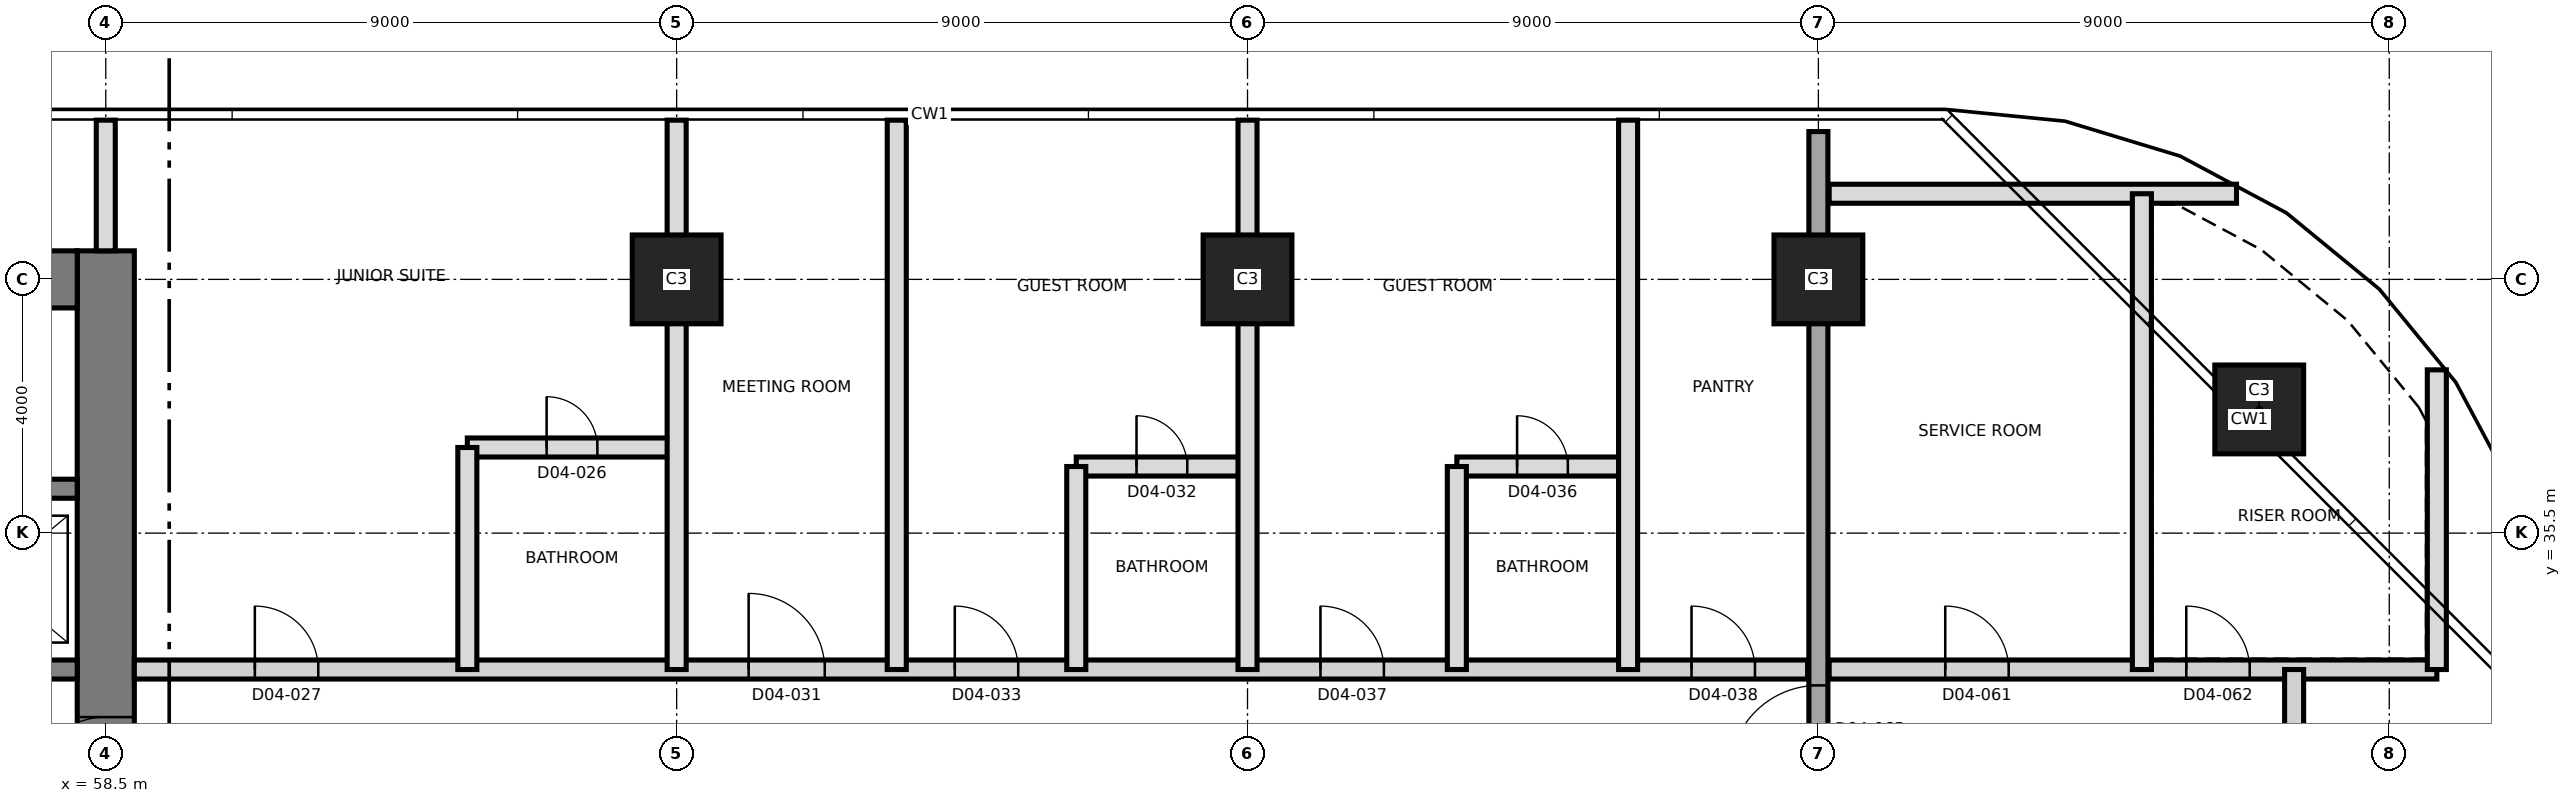
"""IFC4 building model, lengths in metres.
Left out: names, types, materials, properties, quantities, classifications, styles, units other than length and angle.
Written with IfcOpenShell. Run it as: python <this file> out.ifc"""

import sys

from ifc_helpers import new_model, si_unit, direction, frame, frame_2d, origin, origin_2d, place, context, subcontext, project, spatial, rectangle, extrude, element, fill, save


model = new_model("IFC4")
c1 = context("Model", 3, precision=1e-05, world=origin(), true_north=direction((0.0, 1.0)))
c2 = subcontext(c1, "Body", "Model", "MODEL_VIEW")
j1 = project(units=[si_unit("LENGTHUNIT", "METRE"), si_unit("PLANEANGLEUNIT", "RADIAN")], contexts=[c1])
p1 = place(None, origin())
s1 = spatial("IfcSite", under=j1, at=p1, CompositionType="ELEMENT")
p2 = place(p1, origin())
s2 = spatial("IfcBuilding", under=s1, at=p2, CompositionType="ELEMENT")
p3 = place(p2, frame((0.0, 0.0, 66.8)))
s3 = spatial("IfcBuildingStorey", under=s2, at=p3, CompositionType="ELEMENT", Elevation=66.8)
p4 = place(p3, frame((58.5, 21.05, 0.0), z_axis=(0.0, 0.0, 1.0), x_axis=(0.0, 1.0, 0.0)))
e1 = element("IfcWall", 1, at=p4, inside=s3, PredefinedType="SHEAR", context=c2, shape_type="SweptSolid", body=[
    extrude(rectangle(XDim=18.9, YDim=0.9, at=frame_2d((9.45, 0.0))), origin(), (0.0, 0.0, 1.0), 3.7),
])
p5 = place(p4, frame((10.35, 0.0, 0.0)))
e2 = element("IfcOpeningElement", 2, at=p5, cuts=e1, PredefinedType="OPENING", context=c2, shape_type="SweptSolid", body=[
    extrude(rectangle(XDim=1.2, YDim=2.1, at=frame_2d((0.6, 1.05))), frame((0.0, 0.46, 0.0), z_axis=(0.0, -1.0, 0.0), x_axis=(1.0, 0.0, 0.0)), (0.0, 0.0, 1.0), 0.92),
])
p6 = place(p3, frame((31.05, 39.5, 0.0), z_axis=(0.0, 0.0, 1.0), x_axis=(1.0, 0.0, 0.0)))
e3 = element("IfcWall", 3, at=p6, inside=s3, PredefinedType="SHEAR", context=c2, shape_type="SweptSolid", body=[
    extrude(rectangle(XDim=27.0, YDim=0.9, at=frame_2d((13.5, 0.0))), origin(), (0.0, 0.0, 1.0), 3.7),
])
p7 = place(p6, frame((10.65, 0.0, 0.0)))
e4 = element("IfcOpeningElement", 4, at=p7, cuts=e3, PredefinedType="OPENING", context=c2, shape_type="SweptSolid", body=[
    extrude(rectangle(XDim=1.2, YDim=2.1, at=frame_2d((0.6, 1.05))), frame((0.0, 0.46, 0.0), z_axis=(0.0, -1.0, 0.0), x_axis=(1.0, 0.0, 0.0)), (0.0, 0.0, 1.0), 0.92),
])
p8 = place(p3, frame((31.95, 33.35, 0.0), z_axis=(0.0, 0.0, 1.0), x_axis=(1.0, 0.0, 0.0)))
e5 = element("IfcWall", 5, at=p8, inside=s3, PredefinedType="SHEAR", context=c2, shape_type="SweptSolid", body=[
    extrude(rectangle(XDim=26.1, YDim=0.3, at=frame_2d((13.05, 0.0))), origin(), (0.0, 0.0, 1.0), 3.7),
])
p9 = place(p8, frame((13.7, 0.0, 0.0)))
e6 = element("IfcOpeningElement", 6, at=p9, cuts=e5, PredefinedType="OPENING", context=c2, shape_type="SweptSolid", body=[
    extrude(rectangle(XDim=1.4, YDim=2.1, at=frame_2d((0.7, 1.05))), frame((0.0, 0.16, 0.0), z_axis=(0.0, -1.0, 0.0), x_axis=(1.0, 0.0, 0.0)), (0.0, 0.0, 1.0), 0.32),
])
p10 = place(p8, frame((5.175, 0.0, 0.0)))
e7 = element("IfcOpeningElement", 7, at=p10, cuts=e5, PredefinedType="OPENING", context=c2, shape_type="SweptSolid", body=[
    extrude(rectangle(XDim=1.2, YDim=2.1, at=frame_2d((0.6, 1.05))), frame((0.0, 0.16, 0.0), z_axis=(0.0, -1.0, 0.0), x_axis=(1.0, 0.0, 0.0)), (0.0, 0.0, 1.0), 0.32),
])
p11 = place(p8, frame((19.725, 0.0, 0.0)))
e8 = element("IfcOpeningElement", 8, at=p11, cuts=e5, PredefinedType="OPENING", context=c2, shape_type="SweptSolid", body=[
    extrude(rectangle(XDim=1.2, YDim=2.1, at=frame_2d((0.6, 1.05))), frame((0.0, 0.16, 0.0), z_axis=(0.0, -1.0, 0.0), x_axis=(1.0, 0.0, 0.0)), (0.0, 0.0, 1.0), 0.32),
])
p12 = place(p3, frame((43.5, 36.2, 0.0), z_axis=(0.0, 0.0, 1.0), x_axis=(1.0, 0.0, 0.0)))
e9 = element("IfcWall", 9, at=p12, inside=s3, PredefinedType="SHEAR", context=c2, shape_type="SweptSolid", body=[
    extrude(rectangle(XDim=14.55, YDim=0.3, at=frame_2d((7.275, 0.0))), origin(), (0.0, 0.0, 1.0), 3.7),
])
p13 = place(p12, frame((6.9, 0.0, 0.0)))
e10 = element("IfcOpeningElement", 10, at=p13, cuts=e9, PredefinedType="OPENING", context=c2, shape_type="SweptSolid", body=[
    extrude(rectangle(XDim=1.2, YDim=2.1, at=frame_2d((0.6, 1.05))), frame((0.0, 0.16, 0.0), z_axis=(0.0, -1.0, 0.0), x_axis=(1.0, 0.0, 0.0)), (0.0, 0.0, 1.0), 0.32),
])
p14 = place(p12, frame((0.7, 0.0, 0.0)))
e11 = element("IfcOpeningElement", 11, at=p14, cuts=e9, PredefinedType="OPENING", context=c2, shape_type="SweptSolid", body=[
    extrude(rectangle(XDim=1.3, YDim=2.4, at=frame_2d((0.65, 1.2))), frame((0.0, 0.16, 0.0), z_axis=(0.0, -1.0, 0.0), x_axis=(1.0, 0.0, 0.0)), (0.0, 0.0, 1.0), 0.32),
])
p15 = place(p12, frame((3.7, 0.0, 0.0)))
e12 = element("IfcOpeningElement", 12, at=p15, cuts=e9, PredefinedType="OPENING", context=c2, shape_type="SweptSolid", body=[
    extrude(rectangle(XDim=1.3, YDim=2.4, at=frame_2d((0.65, 1.2))), frame((0.0, 0.16, 0.0), z_axis=(0.0, -1.0, 0.0), x_axis=(1.0, 0.0, 0.0)), (0.0, 0.0, 1.0), 0.32),
])
for number, where, z_axis, x_axis in (
    (13, (92.45, 37.45, 0.0), (0.0, 0.0, 1.0), (1.0, 0.0, 0.0)),
    (14, (67.5, 39.5, 0.0), (0.0, 0.0, 1.0), (1.0, 0.0, 0.0)),
    (15, (76.5, 39.5, 0.0), (0.0, 0.0, 1.0), (1.0, 0.0, 0.0)),
    (16, (85.5, 39.5, 0.0), (0.0, 0.0, 1.0), (1.0, 0.0, 0.0)),
):
    element("IfcColumn", number, at=place(p3, frame(where, z_axis=z_axis, x_axis=x_axis)), inside=s3, PredefinedType="COLUMN", context=c2, shape_type="SweptSolid", body=[
        extrude(rectangle(XDim=1.4, YDim=1.4, at=origin_2d()), origin(), (0.0, 0.0, 1.0), 3.7),
    ])
p16 = place(p3, frame((85.5, 19.17, 0.0), z_axis=(0.0, 0.0, 1.0), x_axis=(0.0, 1.0, 0.0)))
e17 = element("IfcWall", 17, at=p16, inside=s3, PredefinedType="SHEAR", context=c2, shape_type="SweptSolid", body=[
    extrude(rectangle(XDim=22.66, YDim=0.3, at=frame_2d((11.33, 0.0))), origin(), (0.0, 0.0, 1.0), 3.7),
])
p17 = place(p16, frame((12.53, 0.0, 0.0)))
e18 = element("IfcOpeningElement", 18, at=p17, cuts=e17, PredefinedType="OPENING", context=c2, shape_type="SweptSolid", body=[
    extrude(rectangle(XDim=1.4, YDim=2.1, at=frame_2d((0.7, 1.05))), frame((0.0, 0.16, 0.0), z_axis=(0.0, -1.0, 0.0), x_axis=(1.0, 0.0, 0.0)), (0.0, 0.0, 1.0), 0.32),
])
p18 = place(p3, frame((58.95, 33.35, 0.0), z_axis=(0.0, 0.0, 1.0), x_axis=(1.0, 0.0, 0.0)))
e19 = element("IfcWall", 19, at=p18, inside=s3, PredefinedType="PARTITIONING", context=c2, shape_type="SweptSolid", body=[
    extrude(rectangle(XDim=26.38, YDim=0.3, at=frame_2d((13.19, 0.0))), origin(), (0.0, 0.0, 1.0), 3.4),
])
p19 = place(p18, frame((1.9, 0.0, 0.0)))
e20 = element("IfcOpeningElement", 20, at=p19, cuts=e19, PredefinedType="OPENING", context=c2, shape_type="SweptSolid", body=[
    extrude(rectangle(XDim=1.0, YDim=2.4, at=frame_2d((0.5, 1.2))), frame((0.0, 0.16, 0.0), z_axis=(0.0, -1.0, 0.0), x_axis=(1.0, 0.0, 0.0)), (0.0, 0.0, 1.0), 0.32),
])
p20 = place(p18, frame((9.685, 0.0, 0.0)))
e21 = element("IfcOpeningElement", 21, at=p20, cuts=e19, PredefinedType="OPENING", context=c2, shape_type="SweptSolid", body=[
    extrude(rectangle(XDim=1.2, YDim=2.1, at=frame_2d((0.6, 1.05))), frame((0.0, 0.16, 0.0), z_axis=(0.0, -1.0, 0.0), x_axis=(1.0, 0.0, 0.0)), (0.0, 0.0, 1.0), 0.32),
])
p21 = place(p18, frame((12.935, 0.0, 0.0)))
e22 = element("IfcOpeningElement", 22, at=p21, cuts=e19, PredefinedType="OPENING", context=c2, shape_type="SweptSolid", body=[
    extrude(rectangle(XDim=1.0, YDim=2.1, at=frame_2d((0.5, 1.05))), frame((0.0, 0.16, 0.0), z_axis=(0.0, -1.0, 0.0), x_axis=(1.0, 0.0, 0.0)), (0.0, 0.0, 1.0), 0.32),
])
p22 = place(p18, frame((18.7, 0.0, 0.0)))
e23 = element("IfcOpeningElement", 23, at=p22, cuts=e19, PredefinedType="OPENING", context=c2, shape_type="SweptSolid", body=[
    extrude(rectangle(XDim=1.0, YDim=2.1, at=frame_2d((0.5, 1.05))), frame((0.0, 0.16, 0.0), z_axis=(0.0, -1.0, 0.0), x_axis=(1.0, 0.0, 0.0)), (0.0, 0.0, 1.0), 0.32),
])
p23 = place(p18, frame((24.55, 0.0, 0.0)))
e24 = element("IfcOpeningElement", 24, at=p23, cuts=e19, PredefinedType="OPENING", context=c2, shape_type="SweptSolid", body=[
    extrude(rectangle(XDim=1.0, YDim=2.1, at=frame_2d((0.5, 1.05))), frame((0.0, 0.16, 0.0), z_axis=(0.0, -1.0, 0.0), x_axis=(1.0, 0.0, 0.0)), (0.0, 0.0, 1.0), 0.32),
])
p24 = place(p3, frame((85.67, 33.35, 0.0), z_axis=(0.0, 0.0, 1.0), x_axis=(1.0, 0.0, 0.0)))
e25 = element("IfcWall", 25, at=p24, inside=s3, PredefinedType="PARTITIONING", context=c2, shape_type="SweptSolid", body=[
    extrude(rectangle(XDim=9.58, YDim=0.3, at=frame_2d((4.79, 0.0))), origin(), (0.0, 0.0, 1.0), 3.4),
])
p25 = place(p24, frame((1.83, 0.0, 0.0)))
e26 = element("IfcOpeningElement", 26, at=p25, cuts=e25, PredefinedType="OPENING", context=c2, shape_type="SweptSolid", body=[
    extrude(rectangle(XDim=1.0, YDim=2.1, at=frame_2d((0.5, 1.05))), frame((0.0, 0.16, 0.0), z_axis=(0.0, -1.0, 0.0), x_axis=(1.0, 0.0, 0.0)), (0.0, 0.0, 1.0), 0.32),
])
p26 = place(p24, frame((5.63, 0.0, 0.0)))
e27 = element("IfcOpeningElement", 27, at=p26, cuts=e25, PredefinedType="OPENING", context=c2, shape_type="SweptSolid", body=[
    extrude(rectangle(XDim=1.0, YDim=2.1, at=frame_2d((0.5, 1.05))), frame((0.0, 0.16, 0.0), z_axis=(0.0, -1.0, 0.0), x_axis=(1.0, 0.0, 0.0)), (0.0, 0.0, 1.0), 0.32),
])
p27 = place(p3, frame((73.8, 36.55, 0.0), z_axis=(0.0, 0.0, 1.0), x_axis=(1.0, 0.0, 0.0)))
e28 = element("IfcWall", 28, at=p27, inside=s3, PredefinedType="PARTITIONING", context=c2, shape_type="SweptSolid", body=[
    extrude(rectangle(XDim=2.7, YDim=0.3, at=frame_2d((1.35, 0.0))), origin(), (0.0, 0.0, 1.0), 3.4),
])
p28 = place(p27, frame((0.95, 0.0, 0.0)))
e29 = element("IfcOpeningElement", 29, at=p28, cuts=e28, PredefinedType="OPENING", context=c2, shape_type="SweptSolid", body=[
    extrude(rectangle(XDim=0.8, YDim=2.1, at=frame_2d((0.4, 1.05))), frame((0.0, 0.16, 0.0), z_axis=(0.0, -1.0, 0.0), x_axis=(1.0, 0.0, 0.0)), (0.0, 0.0, 1.0), 0.32),
])
p29 = place(p3, frame((79.8, 36.55, 0.0), z_axis=(0.0, 0.0, 1.0), x_axis=(1.0, 0.0, 0.0)))
e30 = element("IfcWall", 30, at=p29, inside=s3, PredefinedType="PARTITIONING", context=c2, shape_type="SweptSolid", body=[
    extrude(rectangle(XDim=2.7, YDim=0.3, at=frame_2d((1.35, 0.0))), origin(), (0.0, 0.0, 1.0), 3.4),
])
p30 = place(p29, frame((0.95, 0.0, 0.0)))
e31 = element("IfcOpeningElement", 31, at=p30, cuts=e30, PredefinedType="OPENING", context=c2, shape_type="SweptSolid", body=[
    extrude(rectangle(XDim=0.8, YDim=2.1, at=frame_2d((0.4, 1.05))), frame((0.0, 0.16, 0.0), z_axis=(0.0, -1.0, 0.0), x_axis=(1.0, 0.0, 0.0)), (0.0, 0.0, 1.0), 0.32),
])
p31 = place(p3, frame((64.2, 36.85, 0.0), z_axis=(0.0, 0.0, 1.0), x_axis=(1.0, 0.0, 0.0)))
e32 = element("IfcWall", 32, at=p31, inside=s3, PredefinedType="PARTITIONING", context=c2, shape_type="SweptSolid", body=[
    extrude(rectangle(XDim=3.3, YDim=0.3, at=frame_2d((1.65, 0.0))), origin(), (0.0, 0.0, 1.0), 3.4),
])
p32 = place(p31, frame((1.25, 0.0, 0.0)))
e33 = element("IfcOpeningElement", 33, at=p32, cuts=e32, PredefinedType="OPENING", context=c2, shape_type="SweptSolid", body=[
    extrude(rectangle(XDim=0.8, YDim=2.1, at=frame_2d((0.4, 1.05))), frame((0.0, 0.16, 0.0), z_axis=(0.0, -1.0, 0.0), x_axis=(1.0, 0.0, 0.0)), (0.0, 0.0, 1.0), 0.32),
])
p33 = place(p3, frame((85.67, 40.85, 0.0), z_axis=(0.0, 0.0, 1.0), x_axis=(1.0, 0.0, 0.0)))
e34 = element("IfcWall", 34, at=p33, inside=s3, PredefinedType="PARTITIONING", context=c2, shape_type="SweptSolid", body=[
    extrude(rectangle(XDim=6.422, YDim=0.3, at=frame_2d((3.211, 0.0))), origin(), (0.0, 0.0, 1.0), 3.35),
])
p34 = place(p3, frame((58.5, 39.95, 0.0), z_axis=(0.0, 0.0, 1.0), x_axis=(0.0, 1.0, 0.0)))
e35 = element("IfcWall", 35, at=p34, inside=s3, PredefinedType="PARTITIONING", context=c2, shape_type="SweptSolid", body=[
    extrude(rectangle(XDim=2.06, YDim=0.3, at=frame_2d((1.03, 0.0))), origin(), (0.0, 0.0, 1.0), 3.35),
])
p35 = place(p3, frame((64.2, 33.35, 0.0), z_axis=(0.0, 0.0, 1.0), x_axis=(0.0, 1.0, 0.0)))
e36 = element("IfcWall", 36, at=p35, inside=s3, PredefinedType="PARTITIONING", context=c2, shape_type="SweptSolid", body=[
    extrude(rectangle(XDim=3.5, YDim=0.3, at=frame_2d((1.75, 0.0))), origin(), (0.0, 0.0, 1.0), 3.4),
])
for number, where, z_axis, x_axis in (
    (37, (67.5, 33.35, 0.0), (0.0, 0.0, 1.0), (0.0, 1.0, 0.0)),
    (38, (70.97, 33.35, 0.0), (0.0, 0.0, 1.0), (0.0, 1.0, 0.0)),
):
    element("IfcWall", number, at=place(p3, frame(where, z_axis=z_axis, x_axis=x_axis)), inside=s3, PredefinedType="PARTITIONING", context=c2, shape_type="SweptSolid", body=[
        extrude(rectangle(XDim=8.66, YDim=0.3, at=frame_2d((4.33, 0.0))), origin(), (0.0, 0.0, 1.0), 3.35),
    ])
p36 = place(p3, frame((73.8, 33.35, 0.0), z_axis=(0.0, 0.0, 1.0), x_axis=(0.0, 1.0, 0.0)))
e39 = element("IfcWall", 39, at=p36, inside=s3, PredefinedType="PARTITIONING", context=c2, shape_type="SweptSolid", body=[
    extrude(rectangle(XDim=3.2, YDim=0.3, at=frame_2d((1.6, 0.0))), origin(), (0.0, 0.0, 1.0), 3.4),
])
p37 = place(p3, frame((76.5, 33.35, 0.0), z_axis=(0.0, 0.0, 1.0), x_axis=(0.0, 1.0, 0.0)))
e40 = element("IfcWall", 40, at=p37, inside=s3, PredefinedType="PARTITIONING", context=c2, shape_type="SweptSolid", body=[
    extrude(rectangle(XDim=8.66, YDim=0.3, at=frame_2d((4.33, 0.0))), origin(), (0.0, 0.0, 1.0), 3.35),
])
p38 = place(p3, frame((79.8, 33.35, 0.0), z_axis=(0.0, 0.0, 1.0), x_axis=(0.0, 1.0, 0.0)))
e41 = element("IfcWall", 41, at=p38, inside=s3, PredefinedType="PARTITIONING", context=c2, shape_type="SweptSolid", body=[
    extrude(rectangle(XDim=3.2, YDim=0.3, at=frame_2d((1.6, 0.0))), origin(), (0.0, 0.0, 1.0), 3.4),
])
p39 = place(p3, frame((82.5, 33.35, 0.0), z_axis=(0.0, 0.0, 1.0), x_axis=(0.0, 1.0, 0.0)))
e42 = element("IfcWall", 42, at=p39, inside=s3, PredefinedType="PARTITIONING", context=c2, shape_type="SweptSolid", body=[
    extrude(rectangle(XDim=8.66, YDim=0.3, at=frame_2d((4.33, 0.0))), origin(), (0.0, 0.0, 1.0), 3.35),
])
p40 = place(p3, frame((90.6, 33.35, 0.0), z_axis=(0.0, 0.0, 1.0), x_axis=(0.0, 1.0, 0.0)))
e43 = element("IfcWall", 43, at=p40, inside=s3, PredefinedType="PARTITIONING", context=c2, shape_type="SweptSolid", body=[
    extrude(rectangle(XDim=7.5, YDim=0.3, at=frame_2d((3.75, 0.0))), origin(), (0.0, 0.0, 1.0), 3.35),
])
p41 = place(p3, frame((93.0, 30.65, 0.0), z_axis=(0.0, 0.0, 1.0), x_axis=(0.0, 1.0, 0.0)))
e44 = element("IfcWall", 44, at=p41, inside=s3, PredefinedType="PARTITIONING", context=c2, shape_type="SweptSolid", body=[
    extrude(rectangle(XDim=2.7, YDim=0.3, at=frame_2d((1.35, 0.0))), origin(), (0.0, 0.0, 1.0), 3.4),
])
p42 = place(p3, frame((95.25, 33.35, 0.0), z_axis=(0.0, 0.0, 1.0), x_axis=(0.0, 1.0, 0.0)))
e45 = element("IfcWall", 45, at=p42, inside=s3, PredefinedType="PARTITIONING", context=c2, shape_type="SweptSolid", body=[
    extrude(rectangle(XDim=4.724, YDim=0.3, at=frame_2d((2.362, 0.0))), origin(), (0.0, 0.0, 1.0), 3.35),
])
p43 = place(p5, origin())
e46 = element("IfcDoor", 46, at=p43, inside=s3, OperationType="SINGLE_SWING_LEFT", PredefinedType="DOOR", context=c2, shape_type="SweptSolid", body=[
    extrude(rectangle(XDim=1.2, YDim=2.1, at=frame_2d((0.6, 1.05))), frame((0.0, 0.025, 0.0), z_axis=(0.0, -1.0, 0.0), x_axis=(1.0, 0.0, 0.0)), (0.0, 0.0, 1.0), 0.05),
])
fill(e2, e46)
p44 = place(p32, origin())
e47 = element("IfcDoor", 47, at=p44, inside=s3, OperationType="SINGLE_SWING_LEFT", PredefinedType="DOOR", context=c2, shape_type="SweptSolid", body=[
    extrude(rectangle(XDim=0.8, YDim=2.1, at=frame_2d((0.4, 1.05))), frame((0.0, 0.025, 0.0), z_axis=(0.0, -1.0, 0.0), x_axis=(1.0, 0.0, 0.0)), (0.0, 0.0, 1.0), 0.05),
])
fill(e33, e47)
p45 = place(p19, origin())
e48 = element("IfcDoor", 48, at=p45, inside=s3, OperationType="SINGLE_SWING_LEFT", PredefinedType="DOOR", context=c2, shape_type="SweptSolid", body=[
    extrude(rectangle(XDim=1.0, YDim=2.4, at=frame_2d((0.5, 1.2))), frame((0.0, 0.025, 0.0), z_axis=(0.0, -1.0, 0.0), x_axis=(1.0, 0.0, 0.0)), (0.0, 0.0, 1.0), 0.05),
])
fill(e20, e48)
p46 = place(p20, origin())
e49 = element("IfcDoor", 49, at=p46, inside=s3, OperationType="SINGLE_SWING_RIGHT", PredefinedType="DOOR", context=c2, shape_type="SweptSolid", body=[
    extrude(rectangle(XDim=1.2, YDim=2.1, at=frame_2d((0.6, 1.05))), frame((0.0, 0.025, 0.0), z_axis=(0.0, -1.0, 0.0), x_axis=(1.0, 0.0, 0.0)), (0.0, 0.0, 1.0), 0.05),
])
fill(e21, e49)
p47 = place(p28, origin())
e50 = element("IfcDoor", 50, at=p47, inside=s3, OperationType="SINGLE_SWING_LEFT", PredefinedType="DOOR", context=c2, shape_type="SweptSolid", body=[
    extrude(rectangle(XDim=0.8, YDim=2.1, at=frame_2d((0.4, 1.05))), frame((0.0, 0.025, 0.0), z_axis=(0.0, -1.0, 0.0), x_axis=(1.0, 0.0, 0.0)), (0.0, 0.0, 1.0), 0.05),
])
fill(e29, e50)
p48 = place(p21, origin())
e51 = element("IfcDoor", 51, at=p48, inside=s3, OperationType="SINGLE_SWING_LEFT", PredefinedType="DOOR", context=c2, shape_type="SweptSolid", body=[
    extrude(rectangle(XDim=1.0, YDim=2.1, at=frame_2d((0.5, 1.05))), frame((0.0, 0.025, 0.0), z_axis=(0.0, -1.0, 0.0), x_axis=(1.0, 0.0, 0.0)), (0.0, 0.0, 1.0), 0.05),
])
fill(e22, e51)
p49 = place(p30, origin())
e52 = element("IfcDoor", 52, at=p49, inside=s3, OperationType="SINGLE_SWING_RIGHT", PredefinedType="DOOR", context=c2, shape_type="SweptSolid", body=[
    extrude(rectangle(XDim=0.8, YDim=2.1, at=frame_2d((0.4, 1.05))), frame((0.0, 0.025, 0.0), z_axis=(0.0, -1.0, 0.0), x_axis=(1.0, 0.0, 0.0)), (0.0, 0.0, 1.0), 0.05),
])
fill(e31, e52)
p50 = place(p22, origin())
e53 = element("IfcDoor", 53, at=p50, inside=s3, OperationType="SINGLE_SWING_LEFT", PredefinedType="DOOR", context=c2, shape_type="SweptSolid", body=[
    extrude(rectangle(XDim=1.0, YDim=2.1, at=frame_2d((0.5, 1.05))), frame((0.0, 0.025, 0.0), z_axis=(0.0, -1.0, 0.0), x_axis=(1.0, 0.0, 0.0)), (0.0, 0.0, 1.0), 0.05),
])
fill(e23, e53)
p51 = place(p23, origin())
e54 = element("IfcDoor", 54, at=p51, inside=s3, OperationType="SINGLE_SWING_LEFT", PredefinedType="DOOR", context=c2, shape_type="SweptSolid", body=[
    extrude(rectangle(XDim=1.0, YDim=2.1, at=frame_2d((0.5, 1.05))), frame((0.0, 0.025, 0.0), z_axis=(0.0, -1.0, 0.0), x_axis=(1.0, 0.0, 0.0)), (0.0, 0.0, 1.0), 0.05),
])
fill(e24, e54)
p52 = place(p25, origin())
e55 = element("IfcDoor", 55, at=p52, inside=s3, OperationType="SINGLE_SWING_LEFT", PredefinedType="DOOR", context=c2, shape_type="SweptSolid", body=[
    extrude(rectangle(XDim=1.0, YDim=2.1, at=frame_2d((0.5, 1.05))), frame((0.0, 0.025, 0.0), z_axis=(0.0, -1.0, 0.0), x_axis=(1.0, 0.0, 0.0)), (0.0, 0.0, 1.0), 0.05),
])
fill(e26, e55)
p53 = place(p26, origin())
e56 = element("IfcDoor", 56, at=p53, inside=s3, OperationType="SINGLE_SWING_RIGHT", PredefinedType="DOOR", context=c2, shape_type="SweptSolid", body=[
    extrude(rectangle(XDim=1.0, YDim=2.1, at=frame_2d((0.5, 1.05))), frame((0.0, 0.025, 0.0), z_axis=(0.0, -1.0, 0.0), x_axis=(1.0, 0.0, 0.0)), (0.0, 0.0, 1.0), 0.05),
])
fill(e27, e56)
p54 = place(p17, origin())
e57 = element("IfcDoor", 57, at=p54, inside=s3, OperationType="SINGLE_SWING_RIGHT", PredefinedType="DOOR", context=c2, shape_type="SweptSolid", body=[
    extrude(rectangle(XDim=1.4, YDim=2.1, at=frame_2d((0.7, 1.05))), frame((0.0, 0.025, 0.0), z_axis=(0.0, -1.0, 0.0), x_axis=(1.0, 0.0, 0.0)), (0.0, 0.0, 1.0), 0.05),
])
fill(e18, e57)
save(model, sys.argv[1])
